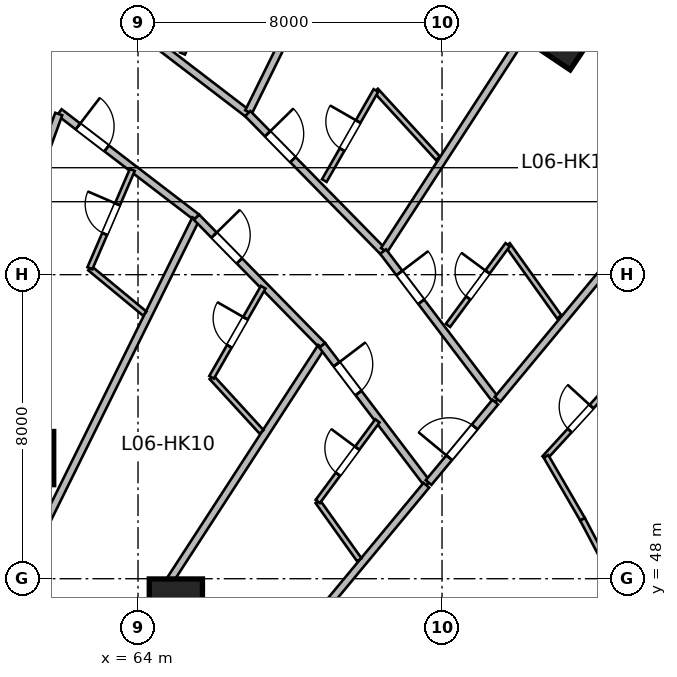
"""IFC4 building model, lengths in metres.
Left out: names, types, materials, properties, quantities, classifications, styles, units other than length and angle.
Written with IfcOpenShell. Run it as: python <this file> out.ifc"""

import sys

from ifc_helpers import new_model, si_unit, direction, frame, frame_2d, origin, origin_2d, place, context, subcontext, project, spatial, rectangle, circle, extrude, source, transform, mapped, element, fill, save


model = new_model("IFC4")
c1 = context("Model", 3, precision=1e-05, world=origin(), true_north=direction((0.0, 1.0)))
c2 = subcontext(c1, "Body", "Model", "MODEL_VIEW")
j1 = project(units=[si_unit("LENGTHUNIT", "METRE"), si_unit("PLANEANGLEUNIT", "RADIAN")], contexts=[c1])
p1 = place(None, origin())
s1 = spatial("IfcSite", under=j1, at=p1, CompositionType="ELEMENT")
p2 = place(p1, origin())
s2 = spatial("IfcBuilding", under=s1, at=p2, CompositionType="ELEMENT")
p3 = place(p2, frame((0.0, 0.0, 35.4)))
s3 = spatial("IfcBuildingStorey", under=s2, at=p3, CompositionType="ELEMENT", Elevation=35.4)
m1 = source(origin(), c2, "Body", "SweptSolid", [
    extrude(circle(Radius=0.7, at=origin_2d()), origin(), (0.0, 0.0, 1.0), 3.6),
])
for number, where, z_axis, x_axis in (
    (1, (61.082, 51.175, 0.0), (0.0, 0.0, 1.0), (0.409, 0.912, 0.0)),
    (2, (64.996, 47.294, 0.0), (0.0, 0.0, 1.0), (0.558, 0.83, 0.0)),
):
    element("IfcColumn", number, at=place(p3, frame(where, z_axis=z_axis, x_axis=x_axis)), inside=s3, PredefinedType="COLUMN", context=c2, shape_type="MappedRepresentation", body=[
        mapped(m1, transform((0.0, 0.0, 0.0), scale=1.0)),
    ])
m2 = source(origin(), c2, "Body", "SweptSolid", [
    extrude(rectangle(XDim=1.5, YDim=1.5, at=origin_2d()), origin(), (0.0, 0.0, 1.0), 3.6),
])
p4 = place(p3, frame((75.167, 62.43, 0.0), z_axis=(0.0, 0.0, 1.0), x_axis=(0.55774510898, 0.830012285095, 0.0)))
e3 = element("IfcColumn", 3, at=p4, inside=s3, PredefinedType="COLUMN", context=c2, shape_type="MappedRepresentation", body=[
    mapped(m2, transform((0.0, 0.0, 0.0), scale=1.0)),
])
m3 = source(origin(), c2, "Body", "SweptSolid", [
    extrude(rectangle(XDim=4.895, YDim=0.195, at=frame_2d((2.447, 0.0))), origin(), (0.0, 0.0, 1.0), 3.36),
])
p5 = place(p3, frame((63.001, 63.214, 0.0), z_axis=(0.0, 0.0, 1.0), x_axis=(0.793896075849, -0.608053468661, 0.0)))
e4 = element("IfcWall", 4, at=p5, inside=s3, PredefinedType="PARTITIONING", context=c2, shape_type="MappedRepresentation", body=[
    mapped(m3, transform((0.0, 0.0, 0.0), scale=1.0)),
])
p6 = place(p5, frame((0.7, 0.0, 0.0)))
e5 = element("IfcOpeningElement", 5, at=p6, cuts=e4, PredefinedType="OPENING", context=c2, shape_type="SweptSolid", body=[
    extrude(rectangle(XDim=0.95, YDim=2.15, at=frame_2d((0.475, 1.075))), frame((0.0, 0.107, 0.0), z_axis=(0.0, -1.0, 0.0), x_axis=(1.0, 0.0, 0.0)), (0.0, 0.0, 1.0), 0.215),
])
m4 = source(origin(), c2, "Body", "SweptSolid", [
    extrude(rectangle(XDim=11.77, YDim=0.195, at=frame_2d((5.885, 0.0))), origin(), (0.0, 0.0, 1.0), 3.36),
])
p7 = place(p3, frame((66.909, 60.282, 0.0), z_axis=(0.0, 0.0, 1.0), x_axis=(0.44286060326, 0.896590478468, 0.0)))
e6 = element("IfcWall", 6, at=p7, inside=s3, PredefinedType="PARTITIONING", context=c2, shape_type="MappedRepresentation", body=[
    mapped(m4, transform((0.0, 0.0, 0.0), scale=1.0)),
])
m5 = source(origin(), c2, "Body", "SweptSolid", [
    extrude(rectangle(XDim=2.818, YDim=0.14, at=frame_2d((1.409, 0.0))), origin(), (0.0, 0.0, 1.0), 3.36),
])
p8 = place(p3, frame((65.17, 61.819, 0.0), z_axis=(0.0, 0.0, 1.0), x_axis=(0.395894859341, 0.918295845764, 0.0)))
e7 = element("IfcWall", 7, at=p8, inside=s3, PredefinedType="PARTITIONING", context=c2, shape_type="MappedRepresentation", body=[
    mapped(m5, transform((0.0, 0.0, 0.0), scale=1.0)),
])
p9 = place(p8, frame((0.984, 0.0, 0.0)))
e8 = element("IfcOpeningElement", 8, at=p9, cuts=e7, PredefinedType="OPENING", context=c2, shape_type="SweptSolid", body=[
    extrude(rectangle(XDim=0.85, YDim=2.05, at=frame_2d((0.425, 1.025))), frame((0.0, 0.08, 0.0), z_axis=(0.0, -1.0, 0.0), x_axis=(1.0, 0.0, 0.0)), (0.0, 0.0, 1.0), 0.16),
])
m6 = source(origin(), c2, "Body", "SweptSolid", [
    extrude(rectangle(XDim=4.546, YDim=0.195, at=frame_2d((2.273, 0.0))), origin(), (0.0, 0.0, 1.0), 3.36),
])
p10 = place(p3, frame((61.931, 60.275, 0.0), z_axis=(0.0, 0.0, 1.0), x_axis=(0.793907931297, -0.608037989457, 0.0)))
e9 = element("IfcWall", 9, at=p10, inside=s3, PredefinedType="PARTITIONING", context=c2, shape_type="MappedRepresentation", body=[
    mapped(m6, transform((0.0, 0.0, 0.0), scale=1.0)),
])
p11 = place(p10, frame((0.616, 0.0, 0.0)))
e10 = element("IfcOpeningElement", 10, at=p11, cuts=e9, PredefinedType="OPENING", context=c2, shape_type="SweptSolid", body=[
    extrude(rectangle(XDim=0.95, YDim=2.15, at=frame_2d((0.475, 1.075))), frame((0.0, 0.107, 0.0), z_axis=(0.0, -1.0, 0.0), x_axis=(1.0, 0.0, 0.0)), (0.0, 0.0, 1.0), 0.215),
])
m7 = source(origin(), c2, "Body", "SweptSolid", [
    extrude(rectangle(XDim=12.196, YDim=0.195, at=frame_2d((6.098, 0.0))), origin(), (0.0, 0.0, 1.0), 3.36),
])
p12 = place(p3, frame((57.742, 48.766, 0.0), z_axis=(0.0, 0.0, 1.0), x_axis=(0.342022711534, 0.939691686031, 0.0)))
e11 = element("IfcWall", 11, at=p12, inside=s3, PredefinedType="PARTITIONING", context=c2, shape_type="MappedRepresentation", body=[
    mapped(m7, transform((0.0, 0.0, 0.0), scale=1.0)),
])
m8 = source(origin(), c2, "Body", "SweptSolid", [
    extrude(rectangle(XDim=11.844, YDim=0.195, at=frame_2d((5.922, 0.0))), origin(), (0.0, 0.0, 1.0), 3.36),
])
p13 = place(p3, frame((60.273, 46.848, 0.0), z_axis=(0.0, 0.0, 1.0), x_axis=(0.442871152218, 0.896585267854, 0.0)))
e12 = element("IfcWall", 12, at=p13, inside=s3, PredefinedType="PARTITIONING", context=c2, shape_type="MappedRepresentation", body=[
    mapped(m8, transform((0.0, 0.0, 0.0), scale=1.0)),
])
m9 = source(origin(), c2, "Body", "SweptSolid", [
    extrude(rectangle(XDim=1.873, YDim=0.14, at=frame_2d((0.937, 0.0))), origin(), (0.0, 0.0, 1.0), 3.36),
])
p14 = place(p3, frame((62.734, 56.169, 0.0), z_axis=(0.0, 0.0, 1.0), x_axis=(0.77069451688, -0.637204803537, 0.0)))
e13 = element("IfcWall", 13, at=p14, inside=s3, PredefinedType="PARTITIONING", context=c2, shape_type="MappedRepresentation", body=[
    mapped(m9, transform((0.0, 0.0, 0.0), scale=1.0)),
])
m10 = source(origin(), c2, "Body", "SweptSolid", [
    extrude(rectangle(XDim=2.817, YDim=0.14, at=frame_2d((1.409, 0.0))), origin(), (0.0, 0.0, 1.0), 3.36),
])
p15 = place(p3, frame((62.734, 56.169, 0.0), z_axis=(0.0, 0.0, 1.0), x_axis=(0.395999429727, 0.918250756415, 0.0)))
e14 = element("IfcWall", 14, at=p15, inside=s3, PredefinedType="PARTITIONING", context=c2, shape_type="MappedRepresentation", body=[
    mapped(m10, transform((0.0, 0.0, 0.0), scale=1.0)),
])
p16 = place(p15, frame((0.984, 0.0, 0.0)))
e15 = element("IfcOpeningElement", 15, at=p16, cuts=e14, PredefinedType="OPENING", context=c2, shape_type="SweptSolid", body=[
    extrude(rectangle(XDim=0.85, YDim=2.05, at=frame_2d((0.425, 1.025))), frame((0.0, 0.08, 0.0), z_axis=(0.0, -1.0, 0.0), x_axis=(1.0, 0.0, 0.0)), (0.0, 0.0, 1.0), 0.16),
])
m11 = source(origin(), c2, "Body", "SweptSolid", [
    extrude(rectangle(XDim=5.087, YDim=0.195, at=frame_2d((2.543, 0.0))), origin(), (0.0, 0.0, 1.0), 3.36),
])
p17 = place(p3, frame((66.887, 60.238, 0.0), z_axis=(0.0, 0.0, 1.0), x_axis=(0.700428330775, -0.7137227427, 0.0)))
e16 = element("IfcWall", 16, at=p17, inside=s3, PredefinedType="PARTITIONING", context=c2, shape_type="MappedRepresentation", body=[
    mapped(m11, transform((0.0, 0.0, 0.0), scale=1.0)),
])
p18 = place(p17, frame((0.746, 0.0, 0.0)))
e17 = element("IfcOpeningElement", 17, at=p18, cuts=e16, PredefinedType="OPENING", context=c2, shape_type="SweptSolid", body=[
    extrude(rectangle(XDim=0.95, YDim=2.15, at=frame_2d((0.475, 1.075))), frame((0.0, 0.107, 0.0), z_axis=(0.0, -1.0, 0.0), x_axis=(1.0, 0.0, 0.0)), (0.0, 0.0, 1.0), 0.215),
])
m12 = source(origin(), c2, "Body", "SweptSolid", [
    extrude(rectangle(XDim=11.403, YDim=0.195, at=frame_2d((5.701, 0.0))), origin(), (0.0, 0.0, 1.0), 3.36),
])
p19 = place(p3, frame((70.477, 56.647, 0.0), z_axis=(0.0, 0.0, 1.0), x_axis=(0.544246090008, 0.838925618581, 0.0)))
e18 = element("IfcWall", 18, at=p19, inside=s3, PredefinedType="PARTITIONING", context=c2, shape_type="MappedRepresentation", body=[
    mapped(m12, transform((0.0, 0.0, 0.0), scale=1.0)),
])
m13 = source(origin(), c2, "Body", "SweptSolid", [
    extrude(rectangle(XDim=2.416, YDim=0.14, at=frame_2d((1.208, 0.0))), origin(), (0.0, 0.0, 1.0), 3.36),
])
p20 = place(p3, frame((70.26, 60.846, 0.0), z_axis=(0.0, 0.0, 1.0), x_axis=(0.675399637907, -0.737451916476, 0.0)))
e19 = element("IfcWall", 19, at=p20, inside=s3, PredefinedType="PARTITIONING", context=c2, shape_type="MappedRepresentation", body=[
    mapped(m13, transform((0.0, 0.0, 0.0), scale=1.0)),
])
m14 = source(origin(), c2, "Body", "SweptSolid", [
    extrude(rectangle(XDim=2.732, YDim=0.14, at=frame_2d((1.366, 0.0))), origin(), (0.0, 0.0, 1.0), 3.36),
])
p21 = place(p3, frame((68.902, 58.476, 0.0), z_axis=(0.0, 0.0, 1.0), x_axis=(0.497254966372, 0.867604459658, 0.0)))
e20 = element("IfcWall", 20, at=p21, inside=s3, PredefinedType="PARTITIONING", context=c2, shape_type="MappedRepresentation", body=[
    mapped(m14, transform((0.0, 0.0, 0.0), scale=1.0)),
])
p22 = place(p21, frame((0.941, 0.0, 0.0)))
e21 = element("IfcOpeningElement", 21, at=p22, cuts=e20, PredefinedType="OPENING", context=c2, shape_type="SweptSolid", body=[
    extrude(rectangle(XDim=0.85, YDim=2.05, at=frame_2d((0.425, 1.025))), frame((0.0, 0.08, 0.0), z_axis=(0.0, -1.0, 0.0), x_axis=(1.0, 0.0, 0.0)), (0.0, 0.0, 1.0), 0.16),
])
m15 = source(origin(), c2, "Body", "SweptSolid", [
    extrude(rectangle(XDim=4.724, YDim=0.195, at=frame_2d((2.362, 0.0))), origin(), (0.0, 0.0, 1.0), 3.36),
])
p23 = place(p3, frame((65.541, 57.511, 0.0), z_axis=(0.0, 0.0, 1.0), x_axis=(0.700435057457, -0.713716141253, 0.0)))
e22 = element("IfcWall", 22, at=p23, inside=s3, PredefinedType="PARTITIONING", context=c2, shape_type="MappedRepresentation", body=[
    mapped(m15, transform((0.0, 0.0, 0.0), scale=1.0)),
])
p24 = place(p23, frame((0.659, 0.0, 0.0)))
e23 = element("IfcOpeningElement", 23, at=p24, cuts=e22, PredefinedType="OPENING", context=c2, shape_type="SweptSolid", body=[
    extrude(rectangle(XDim=0.95, YDim=2.15, at=frame_2d((0.475, 1.075))), frame((0.0, 0.107, 0.0), z_axis=(0.0, -1.0, 0.0), x_axis=(1.0, 0.0, 0.0)), (0.0, 0.0, 1.0), 0.215),
])
m16 = source(origin(), c2, "Body", "SweptSolid", [
    extrude(rectangle(XDim=11.429, YDim=0.195, at=frame_2d((5.714, 0.0))), origin(), (0.0, 0.0, 1.0), 3.36),
])
p25 = place(p3, frame((62.604, 44.511, 0.0), z_axis=(0.0, 0.0, 1.0), x_axis=(0.544215487077, 0.838945471187, 0.0)))
e24 = element("IfcWall", 24, at=p25, inside=s3, PredefinedType="PARTITIONING", context=c2, shape_type="MappedRepresentation", body=[
    mapped(m16, transform((0.0, 0.0, 0.0), scale=1.0)),
])
m17 = source(origin(), c2, "Body", "SweptSolid", [
    extrude(rectangle(XDim=1.947, YDim=0.14, at=frame_2d((0.973, 0.0))), origin(), (0.0, 0.0, 1.0), 3.36),
])
p26 = place(p3, frame((65.936, 53.3, 0.0), z_axis=(0.0, 0.0, 1.0), x_axis=(0.675383794012, -0.737466426888, 0.0)))
e25 = element("IfcWall", 25, at=p26, inside=s3, PredefinedType="PARTITIONING", context=c2, shape_type="MappedRepresentation", body=[
    mapped(m17, transform((0.0, 0.0, 0.0), scale=1.0)),
])
m18 = source(origin(), c2, "Body", "SweptSolid", [
    extrude(rectangle(XDim=2.731, YDim=0.14, at=frame_2d((1.366, 0.0))), origin(), (0.0, 0.0, 1.0), 3.36),
])
p27 = place(p3, frame((65.936, 53.3, 0.0), z_axis=(0.0, 0.0, 1.0), x_axis=(0.497120404056, 0.867681568244, 0.0)))
e26 = element("IfcWall", 26, at=p27, inside=s3, PredefinedType="PARTITIONING", context=c2, shape_type="MappedRepresentation", body=[
    mapped(m18, transform((0.0, 0.0, 0.0), scale=1.0)),
])
p28 = place(p27, frame((0.941, 0.0, 0.0)))
e27 = element("IfcOpeningElement", 27, at=p28, cuts=e26, PredefinedType="OPENING", context=c2, shape_type="SweptSolid", body=[
    extrude(rectangle(XDim=0.85, YDim=2.05, at=frame_2d((0.425, 1.025))), frame((0.0, 0.08, 0.0), z_axis=(0.0, -1.0, 0.0), x_axis=(1.0, 0.0, 0.0)), (0.0, 0.0, 1.0), 0.16),
])
m19 = source(origin(), c2, "Body", "SweptSolid", [
    extrude(rectangle(XDim=4.928, YDim=0.195, at=frame_2d((2.464, 0.0))), origin(), (0.0, 0.0, 1.0), 3.36),
])
p29 = place(p3, frame((70.45, 56.607, 0.0), z_axis=(0.0, 0.0, 1.0), x_axis=(0.604793043708, -0.796382680803, 0.0)))
e28 = element("IfcWall", 28, at=p29, inside=s3, PredefinedType="PARTITIONING", context=c2, shape_type="MappedRepresentation", body=[
    mapped(m19, transform((0.0, 0.0, 0.0), scale=1.0)),
])
p30 = place(p29, frame((0.708, 0.0, 0.0)))
e29 = element("IfcOpeningElement", 29, at=p30, cuts=e28, PredefinedType="OPENING", context=c2, shape_type="SweptSolid", body=[
    extrude(rectangle(XDim=0.95, YDim=2.15, at=frame_2d((0.475, 1.075))), frame((0.0, 0.107, 0.0), z_axis=(0.0, -1.0, 0.0), x_axis=(1.0, 0.0, 0.0)), (0.0, 0.0, 1.0), 0.215),
])
m20 = source(origin(), c2, "Body", "SweptSolid", [
    extrude(rectangle(XDim=10.975, YDim=0.195, at=frame_2d((5.487, 0.0))), origin(), (0.0, 0.0, 1.0), 3.36),
])
p31 = place(p3, frame((73.46, 52.719, 0.0), z_axis=(0.0, 0.0, 1.0), x_axis=(0.638125265812, 0.769932558821, 0.0)))
e30 = element("IfcWall", 30, at=p31, inside=s3, PredefinedType="PARTITIONING", context=c2, shape_type="MappedRepresentation", body=[
    mapped(m20, transform((0.0, 0.0, 0.0), scale=1.0)),
])
m21 = source(origin(), c2, "Body", "SweptSolid", [
    extrude(rectangle(XDim=2.337, YDim=0.14, at=frame_2d((1.169, 0.0))), origin(), (0.0, 0.0, 1.0), 3.36),
])
p32 = place(p3, frame((73.727, 56.789, 0.0), z_axis=(0.0, 0.0, 1.0), x_axis=(0.580862665959, -0.814001574504, 0.0)))
e31 = element("IfcWall", 31, at=p32, inside=s3, PredefinedType="PARTITIONING", context=c2, shape_type="MappedRepresentation", body=[
    mapped(m21, transform((0.0, 0.0, 0.0), scale=1.0)),
])
m22 = source(origin(), c2, "Body", "SweptSolid", [
    extrude(rectangle(XDim=2.64, YDim=0.14, at=frame_2d((1.32, 0.0))), origin(), (0.0, 0.0, 1.0), 3.36),
])
p33 = place(p3, frame((72.157, 54.666, 0.0), z_axis=(0.0, 0.0, 1.0), x_axis=(0.594630255283, 0.803999290735, 0.0)))
e32 = element("IfcWall", 32, at=p33, inside=s3, PredefinedType="PARTITIONING", context=c2, shape_type="MappedRepresentation", body=[
    mapped(m22, transform((0.0, 0.0, 0.0), scale=1.0)),
])
p34 = place(p33, frame((0.895, 0.0, 0.0)))
e33 = element("IfcOpeningElement", 33, at=p34, cuts=e32, PredefinedType="OPENING", context=c2, shape_type="SweptSolid", body=[
    extrude(rectangle(XDim=0.85, YDim=2.05, at=frame_2d((0.425, 1.025))), frame((0.0, 0.08, 0.0), z_axis=(0.0, -1.0, 0.0), x_axis=(1.0, 0.0, 0.0)), (0.0, 0.0, 1.0), 0.16),
])
m23 = source(origin(), c2, "Body", "SweptSolid", [
    extrude(rectangle(XDim=4.576, YDim=0.195, at=frame_2d((2.288, 0.0))), origin(), (0.0, 0.0, 1.0), 3.36),
])
p35 = place(p3, frame((68.85, 54.139, 0.0), z_axis=(0.0, 0.0, 1.0), x_axis=(0.604795096156, -0.796381122118, 0.0)))
e34 = element("IfcWall", 34, at=p35, inside=s3, PredefinedType="PARTITIONING", context=c2, shape_type="MappedRepresentation", body=[
    mapped(m23, transform((0.0, 0.0, 0.0), scale=1.0)),
])
p36 = place(p35, frame((0.623, 0.0, 0.0)))
e35 = element("IfcOpeningElement", 35, at=p36, cuts=e34, PredefinedType="OPENING", context=c2, shape_type="SweptSolid", body=[
    extrude(rectangle(XDim=0.95, YDim=2.15, at=frame_2d((0.475, 1.075))), frame((0.0, 0.107, 0.0), z_axis=(0.0, -1.0, 0.0), x_axis=(1.0, 0.0, 0.0)), (0.0, 0.0, 1.0), 0.215),
])
m24 = source(origin(), c2, "Body", "SweptSolid", [
    extrude(rectangle(XDim=11.053, YDim=0.195, at=frame_2d((5.527, 0.0))), origin(), (0.0, 0.0, 1.0), 3.36),
])
p37 = place(p3, frame((64.534, 41.949, 0.0), z_axis=(0.0, 0.0, 1.0), x_axis=(0.638131235571, 0.769927611005, 0.0)))
e36 = element("IfcWall", 36, at=p37, inside=s3, PredefinedType="PARTITIONING", context=c2, shape_type="MappedRepresentation", body=[
    mapped(m24, transform((0.0, 0.0, 0.0), scale=1.0)),
])
m25 = source(origin(), c2, "Body", "SweptSolid", [
    extrude(rectangle(XDim=1.884, YDim=0.14, at=frame_2d((0.942, 0.0))), origin(), (0.0, 0.0, 1.0), 3.36),
])
p38 = place(p3, frame((68.729, 50.031, 0.0), z_axis=(0.0, 0.0, 1.0), x_axis=(0.580833492897, -0.814022391295, 0.0)))
e37 = element("IfcWall", 37, at=p38, inside=s3, PredefinedType="PARTITIONING", context=c2, shape_type="MappedRepresentation", body=[
    mapped(m25, transform((0.0, 0.0, 0.0), scale=1.0)),
])
p39 = place(p3, frame((68.729, 50.031, 0.0), z_axis=(0.0, 0.0, 1.0), x_axis=(0.594674469522, 0.803966588422, 0.0)))
e38 = element("IfcWall", 38, at=p39, inside=s3, PredefinedType="PARTITIONING", context=c2, shape_type="MappedRepresentation", body=[
    mapped(m22, transform((0.0, 0.0, 0.0), scale=1.0)),
])
p40 = place(p39, frame((0.895, 0.0, 0.0)))
e39 = element("IfcOpeningElement", 39, at=p40, cuts=e38, PredefinedType="OPENING", context=c2, shape_type="SweptSolid", body=[
    extrude(rectangle(XDim=0.85, YDim=2.05, at=frame_2d((0.425, 1.025))), frame((0.0, 0.08, 0.0), z_axis=(0.0, -1.0, 0.0), x_axis=(1.0, 0.0, 0.0)), (0.0, 0.0, 1.0), 0.16),
])
m26 = source(origin(), c2, "Body", "SweptSolid", [
    extrude(rectangle(XDim=2.748, YDim=0.195, at=frame_2d((1.374, 0.0))), origin(), (0.0, 0.0, 1.0), 3.36),
])
p41 = place(p3, frame((71.647, 50.531, 0.0), z_axis=(0.0, 0.0, 1.0), x_axis=(0.638111168284, 0.769944242729, 0.0)))
e40 = element("IfcWall", 40, at=p41, inside=s3, PredefinedType="PARTITIONING", context=c2, shape_type="MappedRepresentation", body=[
    mapped(m26, transform((0.0, 0.0, 0.0), scale=1.0)),
])
p42 = place(p41, frame((0.849, 0.0, 0.0)))
e41 = element("IfcOpeningElement", 41, at=p42, cuts=e40, PredefinedType="OPENING", context=c2, shape_type="SweptSolid", body=[
    extrude(rectangle(XDim=1.05, YDim=2.15, at=frame_2d((0.525, 1.075))), frame((0.0, 0.107, 0.0), z_axis=(0.0, -1.0, 0.0), x_axis=(1.0, 0.0, 0.0)), (0.0, 0.0, 1.0), 0.215),
])
m27 = source(origin(), c2, "Body", "SweptSolid", [
    extrude(rectangle(XDim=2.812, YDim=0.14, at=frame_2d((1.406, 0.0))), origin(), (0.0, 0.0, 1.0), 3.36),
])
p43 = place(p3, frame((74.697, 51.177, 0.0), z_axis=(0.0, 0.0, 1.0), x_axis=(0.675119025852, 0.737708818527, 0.0)))
e42 = element("IfcWall", 42, at=p43, inside=s3, PredefinedType="PARTITIONING", context=c2, shape_type="MappedRepresentation", body=[
    mapped(m27, transform((0.0, 0.0, 0.0), scale=1.0)),
])
p44 = place(p43, frame((0.981, 0.0, 0.0)))
e43 = element("IfcOpeningElement", 43, at=p44, cuts=e42, PredefinedType="OPENING", context=c2, shape_type="SweptSolid", body=[
    extrude(rectangle(XDim=0.85, YDim=2.05, at=frame_2d((0.425, 1.025))), frame((0.0, 0.08, 0.0), z_axis=(0.0, -1.0, 0.0), x_axis=(1.0, 0.0, 0.0)), (0.0, 0.0, 1.0), 0.16),
])
m28 = source(origin(), c2, "Body", "SweptSolid", [
    extrude(rectangle(XDim=1.914, YDim=0.14, at=frame_2d((0.957, 0.0))), origin(), (0.0, 0.0, 1.0), 3.36),
])
p45 = place(p3, frame((74.736, 51.219, 0.0), z_axis=(0.0, 0.0, 1.0), x_axis=(0.502347790612, -0.864665656347, 0.0)))
e44 = element("IfcWall", 44, at=p45, inside=s3, PredefinedType="PARTITIONING", context=c2, shape_type="MappedRepresentation", body=[
    mapped(m28, transform((0.0, 0.0, 0.0), scale=1.0)),
])
m29 = source(origin(), c2, "Body", "SweptSolid", [
    extrude(rectangle(XDim=1.936, YDim=0.14, at=frame_2d((0.968, 0.0))), origin(), (0.0, 0.0, 1.0), 3.36),
])
p46 = place(p3, frame((75.697, 49.563, 0.0), z_axis=(0.0, 0.0, 1.0), x_axis=(0.467174971862, -0.884164886017, 0.0)))
e45 = element("IfcWall", 45, at=p46, inside=s3, PredefinedType="PARTITIONING", context=c2, shape_type="MappedRepresentation", body=[
    mapped(m29, transform((0.0, 0.0, 0.0), scale=1.0)),
])
m30 = source(origin(), c2, "Body", "SweptSolid", [
    extrude(rectangle(XDim=0.95, YDim=2.15, at=frame_2d((0.475, 1.075))), frame((0.0, 0.025, 0.0), z_axis=(0.0, -1.0, 0.0), x_axis=(1.0, 0.0, 0.0)), (0.0, 0.0, 1.0), 0.05),
])
p47 = place(p11, origin())
e46 = element("IfcDoor", 46, at=p47, inside=s3, OperationType="SINGLE_SWING_LEFT", PredefinedType="DOOR", context=c2, shape_type="MappedRepresentation", body=[
    mapped(m30, transform((0.0, 0.0, 0.0), scale=1.0)),
])
fill(e10, e46)
m31 = source(origin(), c2, "Body", "SweptSolid", [
    extrude(rectangle(XDim=0.85, YDim=2.05, at=frame_2d((0.425, 1.025))), frame((0.0, 0.025, 0.0), z_axis=(0.0, -1.0, 0.0), x_axis=(1.0, 0.0, 0.0)), (0.0, 0.0, 1.0), 0.05),
])
p48 = place(p16, origin())
e47 = element("IfcDoor", 47, at=p48, inside=s3, OperationType="SINGLE_SWING_RIGHT", PredefinedType="DOOR", context=c2, shape_type="MappedRepresentation", body=[
    mapped(m31, transform((0.0, 0.0, 0.0), scale=1.0)),
])
fill(e15, e47)
p49 = place(p18, origin())
e48 = element("IfcDoor", 48, at=p49, inside=s3, OperationType="SINGLE_SWING_LEFT", PredefinedType="DOOR", context=c2, shape_type="MappedRepresentation", body=[
    mapped(m30, transform((0.0, 0.0, 0.0), scale=1.0)),
])
fill(e17, e48)
p50 = place(p22, origin())
e49 = element("IfcDoor", 49, at=p50, inside=s3, OperationType="SINGLE_SWING_RIGHT", PredefinedType="DOOR", context=c2, shape_type="MappedRepresentation", body=[
    mapped(m31, transform((0.0, 0.0, 0.0), scale=1.0)),
])
fill(e21, e49)
p51 = place(p24, origin())
e50 = element("IfcDoor", 50, at=p51, inside=s3, OperationType="SINGLE_SWING_LEFT", PredefinedType="DOOR", context=c2, shape_type="MappedRepresentation", body=[
    mapped(m30, transform((0.0, 0.0, 0.0), scale=1.0)),
])
fill(e23, e50)
p52 = place(p28, origin())
e51 = element("IfcDoor", 51, at=p52, inside=s3, OperationType="SINGLE_SWING_RIGHT", PredefinedType="DOOR", context=c2, shape_type="MappedRepresentation", body=[
    mapped(m31, transform((0.0, 0.0, 0.0), scale=1.0)),
])
fill(e27, e51)
p53 = place(p30, origin())
e52 = element("IfcDoor", 52, at=p53, inside=s3, OperationType="SINGLE_SWING_LEFT", PredefinedType="DOOR", context=c2, shape_type="MappedRepresentation", body=[
    mapped(m30, transform((0.0, 0.0, 0.0), scale=1.0)),
])
fill(e29, e52)
p54 = place(p34, origin())
e53 = element("IfcDoor", 53, at=p54, inside=s3, OperationType="SINGLE_SWING_RIGHT", PredefinedType="DOOR", context=c2, shape_type="MappedRepresentation", body=[
    mapped(m31, transform((0.0, 0.0, 0.0), scale=1.0)),
])
fill(e33, e53)
p55 = place(p36, origin())
e54 = element("IfcDoor", 54, at=p55, inside=s3, OperationType="SINGLE_SWING_LEFT", PredefinedType="DOOR", context=c2, shape_type="MappedRepresentation", body=[
    mapped(m30, transform((0.0, 0.0, 0.0), scale=1.0)),
])
fill(e35, e54)
p56 = place(p40, origin())
e55 = element("IfcDoor", 55, at=p56, inside=s3, OperationType="SINGLE_SWING_RIGHT", PredefinedType="DOOR", context=c2, shape_type="MappedRepresentation", body=[
    mapped(m31, transform((0.0, 0.0, 0.0), scale=1.0)),
])
fill(e39, e55)
m32 = source(origin(), c2, "Body", "SweptSolid", [
    extrude(rectangle(XDim=1.05, YDim=2.15, at=frame_2d((0.525, 1.075))), frame((0.0, 0.025, 0.0), z_axis=(0.0, -1.0, 0.0), x_axis=(1.0, 0.0, 0.0)), (0.0, 0.0, 1.0), 0.05),
])
p57 = place(p42, origin())
e56 = element("IfcDoor", 56, at=p57, inside=s3, OperationType="SINGLE_SWING_LEFT", PredefinedType="DOOR", context=c2, shape_type="MappedRepresentation", body=[
    mapped(m32, transform((0.0, 0.0, 0.0), scale=1.0)),
])
fill(e41, e56)
p58 = place(p44, origin())
e57 = element("IfcDoor", 57, at=p58, inside=s3, OperationType="SINGLE_SWING_RIGHT", PredefinedType="DOOR", context=c2, shape_type="MappedRepresentation", body=[
    mapped(m31, transform((0.0, 0.0, 0.0), scale=1.0)),
])
fill(e43, e57)
save(model, sys.argv[1])
